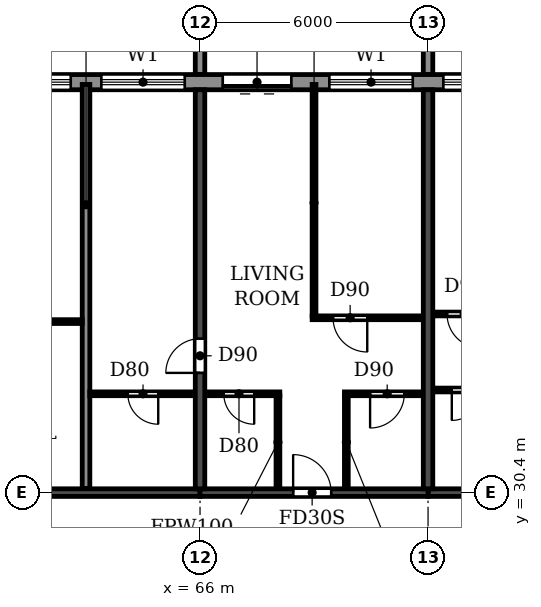
"""IFC4 building model, lengths in metres.
Left out: names, types, materials, properties, quantities, classifications, styles, units other than length and angle.
Written with IfcOpenShell. Run it as: python <this file> out.ifc"""

import sys

from ifc_helpers import new_model, si_unit, direction, frame, frame_2d, origin, place, context, subcontext, project, spatial, polyline, rectangle, outline, extrude, source, transform, mapped, element, fill, save


model = new_model("IFC4")
c1 = context("Model", 3, precision=1e-05, world=origin(), true_north=direction((0.0, 1.0)))
c2 = subcontext(c1, "Body", "Model", "MODEL_VIEW")
j1 = project(units=[si_unit("LENGTHUNIT", "METRE"), si_unit("PLANEANGLEUNIT", "RADIAN")], contexts=[c1])
p1 = place(None, origin())
s1 = spatial("IfcSite", under=j1, at=p1, CompositionType="ELEMENT")
p2 = place(p1, origin())
s2 = spatial("IfcBuilding", under=s1, at=p2, CompositionType="ELEMENT")
p3 = place(p2, frame((0.0, 0.0, 175.2)))
s3 = spatial("IfcBuildingStorey", under=s2, at=p3, CompositionType="ELEMENT", Elevation=175.2)
p4 = place(p3, frame((66.0, 30.5, 0.0), z_axis=(0.0, 0.0, 1.0), x_axis=(0.0, 1.0, 0.0)))
e1 = element("IfcWall", 1, at=p4, inside=s3, PredefinedType="SHEAR", context=c2, shape_type="SweptSolid", body=[
    extrude(rectangle(XDim=10.5, YDim=0.25, at=frame_2d((5.25, 0.0))), origin(), (0.0, 0.0, 1.0), 3.08),
])
p5 = place(p4, frame((3.05, 0.0, 0.0)))
e2 = element("IfcOpeningElement", 2, at=p5, cuts=e1, PredefinedType="OPENING", context=c2, shape_type="SweptSolid", body=[
    extrude(rectangle(XDim=0.9, YDim=2.1, at=frame_2d((0.45, 1.05))), frame((0.0, 0.135, 0.0), z_axis=(0.0, -1.0, 0.0), x_axis=(1.0, 0.0, 0.0)), (0.0, 0.0, 1.0), 0.27),
])
p6 = place(p3, frame((72.0, 30.5, 0.0), z_axis=(0.0, 0.0, 1.0), x_axis=(0.0, 1.0, 0.0)))
e3 = element("IfcWall", 3, at=p6, inside=s3, PredefinedType="SHEAR", context=c2, shape_type="SweptSolid", body=[
    extrude(rectangle(XDim=10.5, YDim=0.25, at=frame_2d((5.25, 0.0))), origin(), (0.0, 0.0, 1.0), 3.08),
])
p7 = place(p3, frame((60.0, 30.4, 0.0), z_axis=(0.0, 0.0, 1.0), x_axis=(1.0, 0.0, 0.0)))
e4 = element("IfcWall", 4, at=p7, inside=s3, PredefinedType="SHEAR", context=c2, shape_type="SweptSolid", body=[
    extrude(rectangle(XDim=6.0, YDim=0.2, at=frame_2d((3.0, 0.0))), origin(), (0.0, 0.0, 1.0), 2.48),
])
p8 = place(p3, frame((66.0, 30.4, 0.0), z_axis=(0.0, 0.0, 1.0), x_axis=(1.0, 0.0, 0.0)))
e5 = element("IfcWall", 5, at=p8, inside=s3, PredefinedType="SHEAR", context=c2, shape_type="SweptSolid", body=[
    extrude(rectangle(XDim=6.0, YDim=0.2, at=frame_2d((3.0, 0.0))), origin(), (0.0, 0.0, 1.0), 2.48),
])
p9 = place(p8, frame((2.45, 0.0, 0.0)))
e6 = element("IfcOpeningElement", 6, at=p9, cuts=e5, PredefinedType="OPENING", context=c2, shape_type="SweptSolid", body=[
    extrude(rectangle(XDim=1.0, YDim=2.1, at=frame_2d((0.5, 1.05))), frame((0.0, 0.11, 0.0), z_axis=(0.0, -1.0, 0.0), x_axis=(1.0, 0.0, 0.0)), (0.0, 0.0, 1.0), 0.22),
])
p10 = place(p3, frame((72.0, 30.4, 0.0), z_axis=(0.0, 0.0, 1.0), x_axis=(1.0, 0.0, 0.0)))
e7 = element("IfcWall", 7, at=p10, inside=s3, PredefinedType="SHEAR", context=c2, shape_type="SweptSolid", body=[
    extrude(rectangle(XDim=6.0, YDim=0.2, at=frame_2d((3.0, 0.0))), origin(), (0.0, 0.0, 1.0), 2.48),
])
p11 = place(p10, frame((2.45, 0.0, 0.0)))
e8 = element("IfcOpeningElement", 8, at=p11, cuts=e7, PredefinedType="OPENING", context=c2, shape_type="SweptSolid", body=[
    extrude(rectangle(XDim=1.0, YDim=2.1, at=frame_2d((0.5, 1.05))), frame((0.0, 0.11, 0.0), z_axis=(0.0, -1.0, 0.0), x_axis=(1.0, 0.0, 0.0)), (0.0, 0.0, 1.0), 0.22),
])
p12 = place(p3, frame((79.317, 41.2, 0.0), z_axis=(0.0, 0.0, 1.0), x_axis=(-1.0, 0.0, 0.0)))
e9 = element("IfcWall", 9, at=p12, inside=s3, PredefinedType="STANDARD", context=c2, shape_type="SweptSolid", body=[
    extrude(rectangle(XDim=56.634, YDim=0.4, at=frame_2d((28.317, 0.0))), origin(), (0.0, 0.0, 1.0), 3.08),
])
p13 = place(p12, frame((52.717, 0.0, 0.9)))
e10 = element("IfcOpeningElement", 10, at=p13, cuts=e9, PredefinedType="OPENING", context=c2, shape_type="SweptSolid", body=[
    extrude(rectangle(XDim=2.2, YDim=1.5, at=frame_2d((1.1, 0.75))), frame((0.0, 0.21, 0.0), z_axis=(0.0, -1.0, 0.0), x_axis=(1.0, 0.0, 0.0)), (0.0, 0.0, 1.0), 0.42),
])
p14 = place(p12, frame((49.917, 0.0, 0.0)))
e11 = element("IfcOpeningElement", 11, at=p14, cuts=e9, PredefinedType="OPENING", context=c2, shape_type="SweptSolid", body=[
    extrude(rectangle(XDim=1.8, YDim=2.4, at=frame_2d((0.9, 1.2))), frame((0.0, 0.21, 0.0), z_axis=(0.0, -1.0, 0.0), x_axis=(1.0, 0.0, 0.0)), (0.0, 0.0, 1.0), 0.42),
])
p15 = place(p12, frame((46.717, 0.0, 0.9)))
e12 = element("IfcOpeningElement", 12, at=p15, cuts=e9, PredefinedType="OPENING", context=c2, shape_type="SweptSolid", body=[
    extrude(rectangle(XDim=2.2, YDim=1.5, at=frame_2d((1.1, 0.75))), frame((0.0, 0.21, 0.0), z_axis=(0.0, -1.0, 0.0), x_axis=(1.0, 0.0, 0.0)), (0.0, 0.0, 1.0), 0.42),
])
p16 = place(p12, frame((43.717, 0.0, 0.9)))
e13 = element("IfcOpeningElement", 13, at=p16, cuts=e9, PredefinedType="OPENING", context=c2, shape_type="SweptSolid", body=[
    extrude(rectangle(XDim=2.2, YDim=1.5, at=frame_2d((1.1, 0.75))), frame((0.0, 0.21, 0.0), z_axis=(0.0, -1.0, 0.0), x_axis=(1.0, 0.0, 0.0)), (0.0, 0.0, 1.0), 0.42),
])
p17 = place(p12, frame((40.917, 0.0, 0.0)))
e14 = element("IfcOpeningElement", 14, at=p17, cuts=e9, PredefinedType="OPENING", context=c2, shape_type="SweptSolid", body=[
    extrude(rectangle(XDim=1.8, YDim=2.4, at=frame_2d((0.9, 1.2))), frame((0.0, 0.21, 0.0), z_axis=(0.0, -1.0, 0.0), x_axis=(1.0, 0.0, 0.0)), (0.0, 0.0, 1.0), 0.42),
])
p18 = place(p12, frame((37.717, 0.0, 0.9)))
e15 = element("IfcOpeningElement", 15, at=p18, cuts=e9, PredefinedType="OPENING", context=c2, shape_type="SweptSolid", body=[
    extrude(rectangle(XDim=2.2, YDim=1.5, at=frame_2d((1.1, 0.75))), frame((0.0, 0.21, 0.0), z_axis=(0.0, -1.0, 0.0), x_axis=(1.0, 0.0, 0.0)), (0.0, 0.0, 1.0), 0.42),
])
p19 = place(p12, frame((34.717, 0.0, 0.9)))
e16 = element("IfcOpeningElement", 16, at=p19, cuts=e9, PredefinedType="OPENING", context=c2, shape_type="SweptSolid", body=[
    extrude(rectangle(XDim=2.2, YDim=1.5, at=frame_2d((1.1, 0.75))), frame((0.0, 0.21, 0.0), z_axis=(0.0, -1.0, 0.0), x_axis=(1.0, 0.0, 0.0)), (0.0, 0.0, 1.0), 0.42),
])
p20 = place(p12, frame((31.717, 0.0, 0.9)))
e17 = element("IfcOpeningElement", 17, at=p20, cuts=e9, PredefinedType="OPENING", context=c2, shape_type="SweptSolid", body=[
    extrude(rectangle(XDim=2.2, YDim=1.5, at=frame_2d((1.1, 0.75))), frame((0.0, 0.21, 0.0), z_axis=(0.0, -1.0, 0.0), x_axis=(1.0, 0.0, 0.0)), (0.0, 0.0, 1.0), 0.42),
])
p21 = place(p12, frame((28.717, 0.0, 0.9)))
e18 = element("IfcOpeningElement", 18, at=p21, cuts=e9, PredefinedType="OPENING", context=c2, shape_type="SweptSolid", body=[
    extrude(rectangle(XDim=2.2, YDim=1.5, at=frame_2d((1.1, 0.75))), frame((0.0, 0.21, 0.0), z_axis=(0.0, -1.0, 0.0), x_axis=(1.0, 0.0, 0.0)), (0.0, 0.0, 1.0), 0.42),
])
p22 = place(p12, frame((25.917, 0.0, 0.0)))
e19 = element("IfcOpeningElement", 19, at=p22, cuts=e9, PredefinedType="OPENING", context=c2, shape_type="SweptSolid", body=[
    extrude(rectangle(XDim=1.8, YDim=2.4, at=frame_2d((0.9, 1.2))), frame((0.0, 0.21, 0.0), z_axis=(0.0, -1.0, 0.0), x_axis=(1.0, 0.0, 0.0)), (0.0, 0.0, 1.0), 0.42),
])
p23 = place(p12, frame((22.717, 0.0, 0.9)))
e20 = element("IfcOpeningElement", 20, at=p23, cuts=e9, PredefinedType="OPENING", context=c2, shape_type="SweptSolid", body=[
    extrude(rectangle(XDim=2.2, YDim=1.5, at=frame_2d((1.1, 0.75))), frame((0.0, 0.21, 0.0), z_axis=(0.0, -1.0, 0.0), x_axis=(1.0, 0.0, 0.0)), (0.0, 0.0, 1.0), 0.42),
])
p24 = place(p12, frame((19.917, 0.0, 0.0)))
e21 = element("IfcOpeningElement", 21, at=p24, cuts=e9, PredefinedType="OPENING", context=c2, shape_type="SweptSolid", body=[
    extrude(rectangle(XDim=1.8, YDim=2.4, at=frame_2d((0.9, 1.2))), frame((0.0, 0.21, 0.0), z_axis=(0.0, -1.0, 0.0), x_axis=(1.0, 0.0, 0.0)), (0.0, 0.0, 1.0), 0.42),
])
p25 = place(p12, frame((16.717, 0.0, 0.9)))
e22 = element("IfcOpeningElement", 22, at=p25, cuts=e9, PredefinedType="OPENING", context=c2, shape_type="SweptSolid", body=[
    extrude(rectangle(XDim=2.2, YDim=1.5, at=frame_2d((1.1, 0.75))), frame((0.0, 0.21, 0.0), z_axis=(0.0, -1.0, 0.0), x_axis=(1.0, 0.0, 0.0)), (0.0, 0.0, 1.0), 0.42),
])
p26 = place(p12, frame((13.717, 0.0, 0.9)))
e23 = element("IfcOpeningElement", 23, at=p26, cuts=e9, PredefinedType="OPENING", context=c2, shape_type="SweptSolid", body=[
    extrude(rectangle(XDim=2.2, YDim=1.5, at=frame_2d((1.1, 0.75))), frame((0.0, 0.21, 0.0), z_axis=(0.0, -1.0, 0.0), x_axis=(1.0, 0.0, 0.0)), (0.0, 0.0, 1.0), 0.42),
])
p27 = place(p12, frame((10.917, 0.0, 0.0)))
e24 = element("IfcOpeningElement", 24, at=p27, cuts=e9, PredefinedType="OPENING", context=c2, shape_type="SweptSolid", body=[
    extrude(rectangle(XDim=1.8, YDim=2.4, at=frame_2d((0.9, 1.2))), frame((0.0, 0.21, 0.0), z_axis=(0.0, -1.0, 0.0), x_axis=(1.0, 0.0, 0.0)), (0.0, 0.0, 1.0), 0.42),
])
p28 = place(p12, frame((7.717, 0.0, 0.9)))
e25 = element("IfcOpeningElement", 25, at=p28, cuts=e9, PredefinedType="OPENING", context=c2, shape_type="SweptSolid", body=[
    extrude(rectangle(XDim=2.2, YDim=1.5, at=frame_2d((1.1, 0.75))), frame((0.0, 0.21, 0.0), z_axis=(0.0, -1.0, 0.0), x_axis=(1.0, 0.0, 0.0)), (0.0, 0.0, 1.0), 0.42),
])
p29 = place(p12, frame((4.717, 0.0, 0.9)))
e26 = element("IfcOpeningElement", 26, at=p29, cuts=e9, PredefinedType="OPENING", context=c2, shape_type="SweptSolid", body=[
    extrude(rectangle(XDim=2.2, YDim=1.5, at=frame_2d((1.1, 0.75))), frame((0.0, 0.21, 0.0), z_axis=(0.0, -1.0, 0.0), x_axis=(1.0, 0.0, 0.0)), (0.0, 0.0, 1.0), 0.42),
])
p30 = place(p12, frame((1.917, 0.0, 0.0)))
e27 = element("IfcOpeningElement", 27, at=p30, cuts=e9, PredefinedType="OPENING", context=c2, shape_type="SweptSolid", body=[
    extrude(rectangle(XDim=1.8, YDim=2.4, at=frame_2d((0.9, 1.2))), frame((0.0, 0.21, 0.0), z_axis=(0.0, -1.0, 0.0), x_axis=(1.0, 0.0, 0.0)), (0.0, 0.0, 1.0), 0.42),
])
m1 = source(origin(), c2, "Body", "SweptSolid", [
    extrude(outline(polyline([(0.0, 0.0), (0.25, 0.0), (0.25, 3.1), (0.0, 3.1), (0.0, 0.0)])), origin(), (0.0, 0.0, 1.0), 3.1),
])
for number, where in (
    (28, (65.875, 41.4, 0.0)),
    (29, (71.875, 41.4, 0.0)),
):
    element("IfcWall", number, at=place(p3, frame(where)), inside=s3, PredefinedType="STANDARD", context=c2, shape_type="MappedRepresentation", body=[
        mapped(m1, transform((0.0, 0.0, 0.0))),
    ])
p31 = place(p3, frame((63.0, 30.51, 0.0), z_axis=(0.0, 0.0, 1.0), x_axis=(0.0, 1.0, 0.0)))
e30 = element("IfcWall", 30, at=p31, inside=s3, PredefinedType="PARTITIONING", context=c2, shape_type="SweptSolid", body=[
    extrude(rectangle(XDim=10.63, YDim=0.2, at=frame_2d((5.315, 0.0))), origin(), (0.0, 0.0, 1.0), 3.08),
])
p32 = place(p3, frame((63.1, 33.0, 0.0), z_axis=(0.0, 0.0, 1.0), x_axis=(1.0, 0.0, 0.0)))
e31 = element("IfcWall", 31, at=p32, inside=s3, PredefinedType="PARTITIONING", context=c2, shape_type="SweptSolid", body=[
    extrude(rectangle(XDim=2.765, YDim=0.1, at=frame_2d((1.382, 0.0))), origin(), (0.0, 0.0, 1.0), 3.08),
])
p33 = place(p32, frame((1.0, 0.0, 0.0)))
e32 = element("IfcOpeningElement", 32, at=p33, cuts=e31, PredefinedType="OPENING", context=c2, shape_type="SweptSolid", body=[
    extrude(rectangle(XDim=0.8, YDim=2.1, at=frame_2d((0.4, 1.05))), frame((0.0, 0.06, 0.0), z_axis=(0.0, -1.0, 0.0), x_axis=(1.0, 0.0, 0.0)), (0.0, 0.0, 1.0), 0.12),
])
p34 = place(p3, frame((66.135, 33.0, 0.0), z_axis=(0.0, 0.0, 1.0), x_axis=(1.0, 0.0, 0.0)))
e33 = element("IfcWall", 33, at=p34, inside=s3, PredefinedType="PARTITIONING", context=c2, shape_type="SweptSolid", body=[
    extrude(rectangle(XDim=1.965, YDim=0.1, at=frame_2d((0.982, 0.0))), origin(), (0.0, 0.0, 1.0), 3.08),
])
p35 = place(p34, frame((0.49, 0.0, 0.0)))
e34 = element("IfcOpeningElement", 34, at=p35, cuts=e33, PredefinedType="OPENING", context=c2, shape_type="SweptSolid", body=[
    extrude(rectangle(XDim=0.8, YDim=2.1, at=frame_2d((0.4, 1.05))), frame((0.0, 0.06, 0.0), z_axis=(0.0, -1.0, 0.0), x_axis=(1.0, 0.0, 0.0)), (0.0, 0.0, 1.0), 0.12),
])
p36 = place(p3, frame((69.8, 33.0, 0.0), z_axis=(0.0, 0.0, 1.0), x_axis=(1.0, 0.0, 0.0)))
e35 = element("IfcWall", 35, at=p36, inside=s3, PredefinedType="PARTITIONING", context=c2, shape_type="SweptSolid", body=[
    extrude(rectangle(XDim=2.065, YDim=0.1, at=frame_2d((1.032, 0.0))), origin(), (0.0, 0.0, 1.0), 3.08),
])
p37 = place(p36, frame((0.675, 0.0, 0.0)))
e36 = element("IfcOpeningElement", 36, at=p37, cuts=e35, PredefinedType="OPENING", context=c2, shape_type="SweptSolid", body=[
    extrude(rectangle(XDim=0.9, YDim=2.1, at=frame_2d((0.45, 1.05))), frame((0.0, 0.06, 0.0), z_axis=(0.0, -1.0, 0.0), x_axis=(1.0, 0.0, 0.0)), (0.0, 0.0, 1.0), 0.12),
])
p38 = place(p3, frame((72.135, 33.1, 0.0), z_axis=(0.0, 0.0, 1.0), x_axis=(1.0, 0.0, 0.0)))
e37 = element("IfcWall", 37, at=p38, inside=s3, PredefinedType="PARTITIONING", context=c2, shape_type="SweptSolid", body=[
    extrude(rectangle(XDim=1.965, YDim=0.1, at=frame_2d((0.982, 0.0))), origin(), (0.0, 0.0, 1.0), 3.08),
])
p39 = place(p38, frame((0.49, 0.0, 0.0)))
e38 = element("IfcOpeningElement", 38, at=p39, cuts=e37, PredefinedType="OPENING", context=c2, shape_type="SweptSolid", body=[
    extrude(rectangle(XDim=0.8, YDim=2.1, at=frame_2d((0.4, 1.05))), frame((0.0, 0.06, 0.0), z_axis=(0.0, -1.0, 0.0), x_axis=(1.0, 0.0, 0.0)), (0.0, 0.0, 1.0), 0.12),
])
p40 = place(p3, frame((60.135, 34.9, 0.0), z_axis=(0.0, 0.0, 1.0), x_axis=(1.0, 0.0, 0.0)))
e39 = element("IfcWall", 39, at=p40, inside=s3, PredefinedType="PARTITIONING", context=c2, shape_type="SweptSolid", body=[
    extrude(rectangle(XDim=2.765, YDim=0.1, at=frame_2d((1.382, 0.0))), origin(), (0.0, 0.0, 1.0), 3.08),
])
p41 = place(p40, frame((0.365, 0.0, 0.0)))
e40 = element("IfcOpeningElement", 40, at=p41, cuts=e39, PredefinedType="OPENING", context=c2, shape_type="SweptSolid", body=[
    extrude(rectangle(XDim=0.9, YDim=2.1, at=frame_2d((0.45, 1.05))), frame((0.0, 0.06, 0.0), z_axis=(0.0, -1.0, 0.0), x_axis=(1.0, 0.0, 0.0)), (0.0, 0.0, 1.0), 0.12),
])
p42 = place(p3, frame((68.95, 35.0, 0.0), z_axis=(0.0, 0.0, 1.0), x_axis=(1.0, 0.0, 0.0)))
e41 = element("IfcWall", 41, at=p42, inside=s3, PredefinedType="PARTITIONING", context=c2, shape_type="SweptSolid", body=[
    extrude(rectangle(XDim=2.915, YDim=0.1, at=frame_2d((1.458, 0.0))), origin(), (0.0, 0.0, 1.0), 3.08),
])
p43 = place(p42, frame((0.55, 0.0, 0.0)))
e42 = element("IfcOpeningElement", 42, at=p43, cuts=e41, PredefinedType="OPENING", context=c2, shape_type="SweptSolid", body=[
    extrude(rectangle(XDim=0.9, YDim=2.1, at=frame_2d((0.45, 1.05))), frame((0.0, 0.06, 0.0), z_axis=(0.0, -1.0, 0.0), x_axis=(1.0, 0.0, 0.0)), (0.0, 0.0, 1.0), 0.12),
])
p44 = place(p3, frame((72.135, 35.1, 0.0), z_axis=(0.0, 0.0, 1.0), x_axis=(1.0, 0.0, 0.0)))
e43 = element("IfcWall", 43, at=p44, inside=s3, PredefinedType="PARTITIONING", context=c2, shape_type="SweptSolid", body=[
    extrude(rectangle(XDim=2.915, YDim=0.1, at=frame_2d((1.458, 0.0))), origin(), (0.0, 0.0, 1.0), 3.08),
])
p45 = place(p44, frame((0.365, 0.0, 0.0)))
e44 = element("IfcOpeningElement", 44, at=p45, cuts=e43, PredefinedType="OPENING", context=c2, shape_type="SweptSolid", body=[
    extrude(rectangle(XDim=0.9, YDim=2.1, at=frame_2d((0.45, 1.05))), frame((0.0, 0.06, 0.0), z_axis=(0.0, -1.0, 0.0), x_axis=(1.0, 0.0, 0.0)), (0.0, 0.0, 1.0), 0.12),
])
p46 = place(p3, frame((68.05, 30.51, 0.0), z_axis=(0.0, 0.0, 1.0), x_axis=(0.0, 1.0, 0.0)))
e45 = element("IfcWall", 45, at=p46, inside=s3, PredefinedType="PARTITIONING", context=c2, shape_type="SweptSolid", body=[
    extrude(rectangle(XDim=2.44, YDim=0.1, at=frame_2d((1.22, 0.0))), origin(), (0.0, 0.0, 1.0), 3.08),
])
p47 = place(p3, frame((69.0, 35.05, 0.0), z_axis=(0.0, 0.0, 1.0), x_axis=(0.0, 1.0, 0.0)))
e46 = element("IfcWall", 46, at=p47, inside=s3, PredefinedType="PARTITIONING", context=c2, shape_type="SweptSolid", body=[
    extrude(rectangle(XDim=6.09, YDim=0.1, at=frame_2d((3.045, 0.0))), origin(), (0.0, 0.0, 1.0), 3.08),
])
p48 = place(p3, frame((69.85, 30.51, 0.0), z_axis=(0.0, 0.0, 1.0), x_axis=(0.0, 1.0, 0.0)))
e47 = element("IfcWall", 47, at=p48, inside=s3, PredefinedType="PARTITIONING", context=c2, shape_type="SweptSolid", body=[
    extrude(rectangle(XDim=2.44, YDim=0.1, at=frame_2d((1.22, 0.0))), origin(), (0.0, 0.0, 1.0), 3.08),
])
p49 = place(p25, origin())
e48 = element("IfcWindow", 48, at=p49, inside=s3, PartitioningType="DOUBLE_PANEL_HORIZONTAL", PredefinedType="WINDOW", context=c2, shape_type="SweptSolid", body=[
    extrude(rectangle(XDim=2.2, YDim=1.5, at=frame_2d((1.1, 0.75))), frame((0.0, 0.03, 0.0), z_axis=(0.0, -1.0, 0.0), x_axis=(1.0, 0.0, 0.0)), (0.0, 0.0, 1.0), 0.06),
])
fill(e22, e48)
p50 = place(p26, origin())
e49 = element("IfcWindow", 49, at=p50, inside=s3, PartitioningType="DOUBLE_PANEL_HORIZONTAL", PredefinedType="WINDOW", context=c2, shape_type="SweptSolid", body=[
    extrude(rectangle(XDim=2.2, YDim=1.5, at=frame_2d((1.1, 0.75))), frame((0.0, 0.03, 0.0), z_axis=(0.0, -1.0, 0.0), x_axis=(1.0, 0.0, 0.0)), (0.0, 0.0, 1.0), 0.06),
])
fill(e23, e49)
p51 = place(p27, origin())
e50 = element("IfcDoor", 50, at=p51, inside=s3, OperationType="DOUBLE_DOOR_SLIDING", PredefinedType="DOOR", context=c2, shape_type="SweptSolid", body=[
    extrude(rectangle(XDim=1.8, YDim=2.4, at=frame_2d((0.9, 1.2))), frame((0.0, 0.025, 0.0), z_axis=(0.0, -1.0, 0.0), x_axis=(1.0, 0.0, 0.0)), (0.0, 0.0, 1.0), 0.05),
])
fill(e24, e50)
p52 = place(p28, origin())
e51 = element("IfcWindow", 51, at=p52, inside=s3, PartitioningType="DOUBLE_PANEL_HORIZONTAL", PredefinedType="WINDOW", context=c2, shape_type="SweptSolid", body=[
    extrude(rectangle(XDim=2.2, YDim=1.5, at=frame_2d((1.1, 0.75))), frame((0.0, 0.03, 0.0), z_axis=(0.0, -1.0, 0.0), x_axis=(1.0, 0.0, 0.0)), (0.0, 0.0, 1.0), 0.06),
])
fill(e25, e51)
p53 = place(p29, origin())
e52 = element("IfcWindow", 52, at=p53, inside=s3, PartitioningType="DOUBLE_PANEL_HORIZONTAL", PredefinedType="WINDOW", context=c2, shape_type="SweptSolid", body=[
    extrude(rectangle(XDim=2.2, YDim=1.5, at=frame_2d((1.1, 0.75))), frame((0.0, 0.03, 0.0), z_axis=(0.0, -1.0, 0.0), x_axis=(1.0, 0.0, 0.0)), (0.0, 0.0, 1.0), 0.06),
])
fill(e26, e52)
p54 = place(p33, frame((0.8, 0.0, 0.0), z_axis=(0.0, 0.0, 1.0), x_axis=(-1.0, 0.0, 0.0)))
e53 = element("IfcDoor", 53, at=p54, inside=s3, OperationType="SINGLE_SWING_LEFT", PredefinedType="DOOR", context=c2, shape_type="SweptSolid", body=[
    extrude(rectangle(XDim=0.8, YDim=2.1, at=frame_2d((0.4, 1.05))), frame((0.0, 0.025, 0.0), z_axis=(0.0, -1.0, 0.0), x_axis=(1.0, 0.0, 0.0)), (0.0, 0.0, 1.0), 0.05),
])
fill(e32, e53)
p55 = place(p5, origin())
e54 = element("IfcDoor", 54, at=p55, inside=s3, OperationType="SINGLE_SWING_LEFT", PredefinedType="DOOR", context=c2, shape_type="SweptSolid", body=[
    extrude(rectangle(XDim=0.9, YDim=2.1, at=frame_2d((0.45, 1.05))), frame((0.0, 0.025, 0.0), z_axis=(0.0, -1.0, 0.0), x_axis=(1.0, 0.0, 0.0)), (0.0, 0.0, 1.0), 0.05),
])
fill(e2, e54)
p56 = place(p35, frame((0.8, 0.0, 0.0), z_axis=(0.0, 0.0, 1.0), x_axis=(-1.0, 0.0, 0.0)))
e55 = element("IfcDoor", 55, at=p56, inside=s3, OperationType="SINGLE_SWING_LEFT", PredefinedType="DOOR", context=c2, shape_type="SweptSolid", body=[
    extrude(rectangle(XDim=0.8, YDim=2.1, at=frame_2d((0.4, 1.05))), frame((0.0, 0.025, 0.0), z_axis=(0.0, -1.0, 0.0), x_axis=(1.0, 0.0, 0.0)), (0.0, 0.0, 1.0), 0.05),
])
fill(e34, e55)
p57 = place(p9, origin())
e56 = element("IfcDoor", 56, at=p57, inside=s3, OperationType="SINGLE_SWING_LEFT", PredefinedType="DOOR", context=c2, shape_type="SweptSolid", body=[
    extrude(rectangle(XDim=1.0, YDim=2.1, at=frame_2d((0.5, 1.05))), frame((0.0, 0.025, 0.0), z_axis=(0.0, -1.0, 0.0), x_axis=(1.0, 0.0, 0.0)), (0.0, 0.0, 1.0), 0.05),
])
fill(e6, e56)
p58 = place(p43, frame((0.9, 0.0, 0.0), z_axis=(0.0, 0.0, 1.0), x_axis=(-1.0, 0.0, 0.0)))
e57 = element("IfcDoor", 57, at=p58, inside=s3, OperationType="SINGLE_SWING_LEFT", PredefinedType="DOOR", context=c2, shape_type="SweptSolid", body=[
    extrude(rectangle(XDim=0.9, YDim=2.1, at=frame_2d((0.45, 1.05))), frame((0.0, 0.025, 0.0), z_axis=(0.0, -1.0, 0.0), x_axis=(1.0, 0.0, 0.0)), (0.0, 0.0, 1.0), 0.05),
])
fill(e42, e57)
p59 = place(p37, frame((0.9, 0.0, 0.0), z_axis=(0.0, 0.0, 1.0), x_axis=(-1.0, 0.0, 0.0)))
e58 = element("IfcDoor", 58, at=p59, inside=s3, OperationType="SINGLE_SWING_RIGHT", PredefinedType="DOOR", context=c2, shape_type="SweptSolid", body=[
    extrude(rectangle(XDim=0.9, YDim=2.1, at=frame_2d((0.45, 1.05))), frame((0.0, 0.025, 0.0), z_axis=(0.0, -1.0, 0.0), x_axis=(1.0, 0.0, 0.0)), (0.0, 0.0, 1.0), 0.05),
])
fill(e36, e58)
p60 = place(p45, frame((0.9, 0.0, 0.0), z_axis=(0.0, 0.0, 1.0), x_axis=(-1.0, 0.0, 0.0)))
e59 = element("IfcDoor", 59, at=p60, inside=s3, OperationType="SINGLE_SWING_LEFT", PredefinedType="DOOR", context=c2, shape_type="SweptSolid", body=[
    extrude(rectangle(XDim=0.9, YDim=2.1, at=frame_2d((0.45, 1.05))), frame((0.0, 0.025, 0.0), z_axis=(0.0, -1.0, 0.0), x_axis=(1.0, 0.0, 0.0)), (0.0, 0.0, 1.0), 0.05),
])
fill(e44, e59)
p61 = place(p39, frame((0.8, 0.0, 0.0), z_axis=(0.0, 0.0, 1.0), x_axis=(-1.0, 0.0, 0.0)))
e60 = element("IfcDoor", 60, at=p61, inside=s3, OperationType="SINGLE_SWING_RIGHT", PredefinedType="DOOR", context=c2, shape_type="SweptSolid", body=[
    extrude(rectangle(XDim=0.8, YDim=2.1, at=frame_2d((0.4, 1.05))), frame((0.0, 0.025, 0.0), z_axis=(0.0, -1.0, 0.0), x_axis=(1.0, 0.0, 0.0)), (0.0, 0.0, 1.0), 0.05),
])
fill(e38, e60)
save(model, sys.argv[1])
